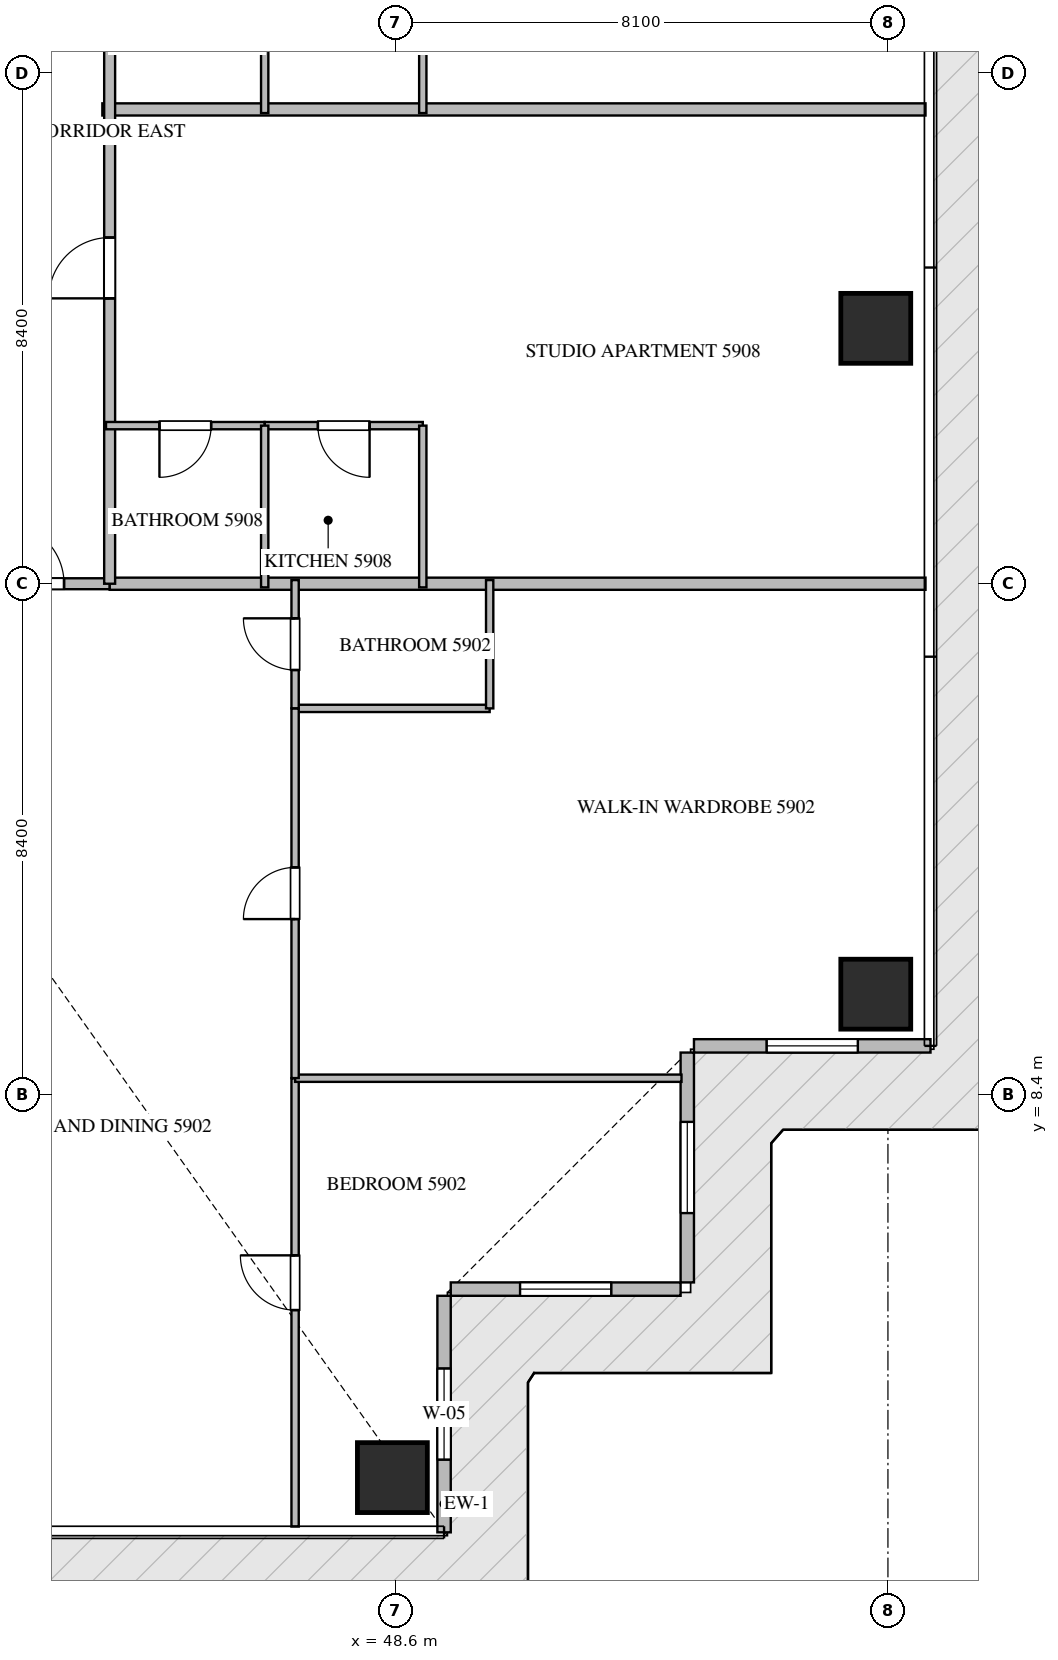
"""IFC4 building model, lengths in metres.
Left out: names, types, materials, properties, quantities, classifications, styles, units other than length and angle.
Written with IfcOpenShell. Run it as: python <this file> out.ifc"""

import sys

from ifc_helpers import new_model, si_unit, direction, frame, frame_2d, origin, origin_2d, place, context, subcontext, project, spatial, rectangle, extrude, source, transform, mapped, element, fill, save


model = new_model("IFC4")
c1 = context("Model", 3, precision=1e-05, world=origin(), true_north=direction((0.0, 1.0)))
c2 = subcontext(c1, "Body", "Model", "MODEL_VIEW")
j1 = project(units=[si_unit("LENGTHUNIT", "METRE"), si_unit("PLANEANGLEUNIT", "RADIAN")], contexts=[c1])
p1 = place(None, origin())
s1 = spatial("IfcSite", under=j1, at=p1, CompositionType="ELEMENT")
p2 = place(p1, origin())
s2 = spatial("IfcBuilding", under=s1, at=p2, CompositionType="ELEMENT")
p3 = place(p2, frame((0.0, 0.0, 237.4)))
s3 = spatial("IfcBuildingStorey", under=s2, at=p3, CompositionType="ELEMENT", Elevation=237.4)
m1 = source(origin(), c2, "Body", "SweptSolid", [
    extrude(rectangle(XDim=1.15, YDim=1.15, at=origin_2d()), origin(), (0.0, 0.0, 1.0), 3.85),
])
for number, where, z_axis, x_axis in (
    (1, (48.55, 2.1, -0.26), (0.0, 0.0, 1.0), (1.0, 0.0, 0.0)),
    (2, (56.5, 10.05, -0.26), (0.0, 0.0, 1.0), (1.0, 0.0, 0.0)),
    (3, (56.5, 21.0, -0.26), (0.0, 0.0, 1.0), (1.0, 0.0, 0.0)),
):
    element("IfcColumn", number, at=place(p3, frame(where, z_axis=z_axis, x_axis=x_axis)), inside=s3, PredefinedType="COLUMN", context=c2, shape_type="MappedRepresentation", body=[
        mapped(m1, transform((0.0, 0.0, 0.0), scale=1.0)),
    ])
p4 = place(p3, frame((49.4, 1.2, 0.0), z_axis=(0.0, 0.0, 1.0), x_axis=(0.0, 1.0, 0.0)))
e4 = element("IfcWall", 4, at=p4, inside=s3, PredefinedType="ELEMENTEDWALL", context=c2, shape_type="SweptSolid", body=[
    extrude(rectangle(XDim=3.89, YDim=0.22, at=frame_2d((1.945, 0.0))), origin(), (0.0, 0.0, 1.0), 3.575),
])
p5 = place(p4, frame((1.195, 0.0, 0.65)))
e5 = element("IfcOpeningElement", 5, at=p5, cuts=e4, PredefinedType="OPENING", context=c2, shape_type="SweptSolid", body=[
    extrude(rectangle(XDim=1.5, YDim=2.25, at=frame_2d((0.75, 1.125))), frame((0.0, 0.12, 0.0), z_axis=(0.0, -1.0, 0.0), x_axis=(1.0, 0.0, 0.0)), (0.0, 0.0, 1.0), 0.24),
])
p6 = place(p3, frame((49.51, 5.2, 0.0), z_axis=(0.0, 0.0, 1.0), x_axis=(1.0, 0.0, 0.0)))
e6 = element("IfcWall", 6, at=p6, inside=s3, PredefinedType="ELEMENTEDWALL", context=c2, shape_type="SweptSolid", body=[
    extrude(rectangle(XDim=3.78, YDim=0.22, at=frame_2d((1.89, 0.0))), origin(), (0.0, 0.0, 1.0), 3.575),
])
p7 = place(p6, frame((1.14, 0.0, 0.65)))
e7 = element("IfcOpeningElement", 7, at=p7, cuts=e6, PredefinedType="OPENING", context=c2, shape_type="SweptSolid", body=[
    extrude(rectangle(XDim=1.5, YDim=2.25, at=frame_2d((0.75, 1.125))), frame((0.0, 0.12, 0.0), z_axis=(0.0, -1.0, 0.0), x_axis=(1.0, 0.0, 0.0)), (0.0, 0.0, 1.0), 0.24),
])
p8 = place(p3, frame((53.4, 5.31, 0.0), z_axis=(0.0, 0.0, 1.0), x_axis=(0.0, 1.0, 0.0)))
e8 = element("IfcWall", 8, at=p8, inside=s3, PredefinedType="ELEMENTEDWALL", context=c2, shape_type="SweptSolid", body=[
    extrude(rectangle(XDim=3.78, YDim=0.22, at=frame_2d((1.89, 0.0))), origin(), (0.0, 0.0, 1.0), 3.575),
])
p9 = place(p8, frame((1.14, 0.0, 0.65)))
e9 = element("IfcOpeningElement", 9, at=p9, cuts=e8, PredefinedType="OPENING", context=c2, shape_type="SweptSolid", body=[
    extrude(rectangle(XDim=1.5, YDim=2.25, at=frame_2d((0.75, 1.125))), frame((0.0, 0.12, 0.0), z_axis=(0.0, -1.0, 0.0), x_axis=(1.0, 0.0, 0.0)), (0.0, 0.0, 1.0), 0.24),
])
p10 = place(p3, frame((53.51, 9.2, 0.0), z_axis=(0.0, 0.0, 1.0), x_axis=(1.0, 0.0, 0.0)))
e10 = element("IfcWall", 10, at=p10, inside=s3, PredefinedType="ELEMENTEDWALL", context=c2, shape_type="SweptSolid", body=[
    extrude(rectangle(XDim=3.89, YDim=0.22, at=frame_2d((1.945, 0.0))), origin(), (0.0, 0.0, 1.0), 3.575),
])
p11 = place(p10, frame((1.195, 0.0, 0.65)))
e11 = element("IfcOpeningElement", 11, at=p11, cuts=e10, PredefinedType="OPENING", context=c2, shape_type="SweptSolid", body=[
    extrude(rectangle(XDim=1.5, YDim=2.25, at=frame_2d((0.75, 1.125))), frame((0.0, 0.12, 0.0), z_axis=(0.0, -1.0, 0.0), x_axis=(1.0, 0.0, 0.0)), (0.0, 0.0, 1.0), 0.24),
])
p12 = place(p3, frame((43.78, 24.6, 0.0), z_axis=(0.0, 0.0, 1.0), x_axis=(1.0, 0.0, 0.0)))
e12 = element("IfcWall", 12, at=p12, inside=s3, PredefinedType="PARTITIONING", context=c2, shape_type="SweptSolid", body=[
    extrude(rectangle(XDim=13.538, YDim=0.2, at=frame_2d((6.769, 0.0))), origin(), (0.0, 0.0, 1.0), 3.59),
])
p13 = place(p3, frame((43.9, 16.8, 0.0), z_axis=(0.0, 0.0, 1.0), x_axis=(1.0, 0.0, 0.0)))
e13 = element("IfcWall", 13, at=p13, inside=s3, PredefinedType="PARTITIONING", context=c2, shape_type="SweptSolid", body=[
    extrude(rectangle(XDim=13.418, YDim=0.2, at=frame_2d((6.709, 0.0))), origin(), (0.0, 0.0, 1.0), 3.59),
])
p14 = place(p3, frame((41.402, 16.8, 0.0), z_axis=(0.0, 0.0, 1.0), x_axis=(1.0, 0.0, 0.0)))
e14 = element("IfcWall", 14, at=p14, inside=s3, PredefinedType="PARTITIONING", context=c2, shape_type="SweptSolid", body=[
    extrude(rectangle(XDim=2.496, YDim=0.18, at=frame_2d((1.248, 0.0))), origin(), (0.0, 0.0, 1.0), 3.59),
])
p15 = place(p14, frame((0.748, 0.0, 0.0)))
e15 = element("IfcOpeningElement", 15, at=p15, cuts=e14, PredefinedType="OPENING", context=c2, shape_type="SweptSolid", body=[
    extrude(rectangle(XDim=1.0, YDim=2.15, at=frame_2d((0.5, 1.075))), frame((0.0, 0.1, 0.0), z_axis=(0.0, -1.0, 0.0), x_axis=(1.0, 0.0, 0.0)), (0.0, 0.0, 1.0), 0.2),
])
p16 = place(p3, frame((43.9, 16.8, 0.0), z_axis=(0.0, 0.0, 1.0), x_axis=(0.0, 1.0, 0.0)))
e16 = element("IfcWall", 16, at=p16, inside=s3, PredefinedType="PARTITIONING", context=c2, shape_type="SweptSolid", body=[
    extrude(rectangle(XDim=16.8, YDim=0.18, at=frame_2d((8.4, 0.0))), origin(), (0.0, 0.0, 1.0), 3.59),
])
p17 = place(p16, frame((4.693, 0.0, 0.0)))
e17 = element("IfcOpeningElement", 17, at=p17, cuts=e16, PredefinedType="OPENING", context=c2, shape_type="SweptSolid", body=[
    extrude(rectangle(XDim=1.0, YDim=2.15, at=frame_2d((0.5, 1.075))), frame((0.0, 0.1, 0.0), z_axis=(0.0, -1.0, 0.0), x_axis=(1.0, 0.0, 0.0)), (0.0, 0.0, 1.0), 0.2),
])
p18 = place(p16, frame((13.13, 0.0, 0.0)))
e18 = element("IfcOpeningElement", 18, at=p18, cuts=e16, PredefinedType="OPENING", context=c2, shape_type="SweptSolid", body=[
    extrude(rectangle(XDim=1.0, YDim=2.15, at=frame_2d((0.5, 1.075))), frame((0.0, 0.1, 0.0), z_axis=(0.0, -1.0, 0.0), x_axis=(1.0, 0.0, 0.0)), (0.0, 0.0, 1.0), 0.2),
])
p19 = place(p3, frame((46.95, 1.295, 0.0), z_axis=(0.0, 0.0, 1.0), x_axis=(0.0, 1.0, 0.0)))
e19 = element("IfcWall", 19, at=p19, inside=s3, PredefinedType="PARTITIONING", context=c2, shape_type="SweptSolid", body=[
    extrude(rectangle(XDim=7.373, YDim=0.12, at=frame_2d((3.687, 0.0))), origin(), (0.0, 0.0, 1.0), 3.59),
])
p20 = place(p19, frame((3.56, 0.0, 0.0)))
e20 = element("IfcOpeningElement", 20, at=p20, cuts=e19, PredefinedType="OPENING", context=c2, shape_type="SweptSolid", body=[
    extrude(rectangle(XDim=0.9, YDim=2.1, at=frame_2d((0.45, 1.05))), frame((0.0, 0.07, 0.0), z_axis=(0.0, -1.0, 0.0), x_axis=(1.0, 0.0, 0.0)), (0.0, 0.0, 1.0), 0.14),
])
p21 = place(p3, frame((46.95, 8.668, 0.0), z_axis=(0.0, 0.0, 1.0), x_axis=(1.0, 0.0, 0.0)))
e21 = element("IfcWall", 21, at=p21, inside=s3, PredefinedType="PARTITIONING", context=c2, shape_type="SweptSolid", body=[
    extrude(rectangle(XDim=6.355, YDim=0.12, at=frame_2d((3.177, 0.0))), origin(), (0.0, 0.0, 1.0), 3.59),
])
p22 = place(p3, frame((46.95, 14.75, 0.0), z_axis=(0.0, 0.0, 1.0), x_axis=(1.0, 0.0, 0.0)))
e22 = element("IfcWall", 22, at=p22, inside=s3, PredefinedType="PARTITIONING", context=c2, shape_type="SweptSolid", body=[
    extrude(rectangle(XDim=3.2, YDim=0.12, at=frame_2d((1.6, 0.0))), origin(), (0.0, 0.0, 1.0), 3.59),
])
p23 = place(p3, frame((50.15, 14.75, 0.0), z_axis=(0.0, 0.0, 1.0), x_axis=(0.0, 1.0, 0.0)))
e23 = element("IfcWall", 23, at=p23, inside=s3, PredefinedType="PARTITIONING", context=c2, shape_type="SweptSolid", body=[
    extrude(rectangle(XDim=2.11, YDim=0.12, at=frame_2d((1.055, 0.0))), origin(), (0.0, 0.0, 1.0), 3.59),
])
p24 = place(p3, frame((46.95, 8.67, 0.0), z_axis=(0.0, 0.0, 1.0), x_axis=(0.0, 1.0, 0.0)))
e24 = element("IfcWall", 24, at=p24, inside=s3, PredefinedType="PARTITIONING", context=c2, shape_type="SweptSolid", body=[
    extrude(rectangle(XDim=6.08, YDim=0.12, at=frame_2d((3.04, 0.0))), origin(), (0.0, 0.0, 1.0), 3.59),
])
p25 = place(p24, frame((2.615, 0.0, 0.0)))
e25 = element("IfcOpeningElement", 25, at=p25, cuts=e24, PredefinedType="OPENING", context=c2, shape_type="SweptSolid", body=[
    extrude(rectangle(XDim=0.85, YDim=2.1, at=frame_2d((0.425, 1.05))), frame((0.0, 0.07, 0.0), z_axis=(0.0, -1.0, 0.0), x_axis=(1.0, 0.0, 0.0)), (0.0, 0.0, 1.0), 0.14),
])
p26 = place(p3, frame((46.95, 14.752, 0.0), z_axis=(0.0, 0.0, 1.0), x_axis=(0.0, 1.0, 0.0)))
e26 = element("IfcWall", 26, at=p26, inside=s3, PredefinedType="PARTITIONING", context=c2, shape_type="SweptSolid", body=[
    extrude(rectangle(XDim=2.108, YDim=0.12, at=frame_2d((1.054, 0.0))), origin(), (0.0, 0.0, 1.0), 3.59),
])
p27 = place(p26, frame((0.629, 0.0, 0.0)))
e27 = element("IfcOpeningElement", 27, at=p27, cuts=e26, PredefinedType="OPENING", context=c2, shape_type="SweptSolid", body=[
    extrude(rectangle(XDim=0.85, YDim=2.1, at=frame_2d((0.425, 1.05))), frame((0.0, 0.07, 0.0), z_axis=(0.0, -1.0, 0.0), x_axis=(1.0, 0.0, 0.0)), (0.0, 0.0, 1.0), 0.14),
])
p28 = place(p3, frame((49.05, 19.4, 0.0), z_axis=(0.0, 0.0, 1.0), x_axis=(-1.0, 0.0, 0.0)))
e28 = element("IfcWall", 28, at=p28, inside=s3, PredefinedType="PARTITIONING", context=c2, shape_type="SweptSolid", body=[
    extrude(rectangle(XDim=2.6, YDim=0.12, at=frame_2d((1.3, 0.0))), origin(), (0.0, 0.0, 1.0), 3.59),
])
p29 = place(p28, frame((0.875, 0.0, 0.0)))
e29 = element("IfcOpeningElement", 29, at=p29, cuts=e28, PredefinedType="OPENING", context=c2, shape_type="SweptSolid", body=[
    extrude(rectangle(XDim=0.85, YDim=2.1, at=frame_2d((0.425, 1.05))), frame((0.0, 0.07, 0.0), z_axis=(0.0, -1.0, 0.0), x_axis=(1.0, 0.0, 0.0)), (0.0, 0.0, 1.0), 0.14),
])
p30 = place(p3, frame((46.448, 19.4, 0.0), z_axis=(0.0, 0.0, 1.0), x_axis=(-1.0, 0.0, 0.0)))
e30 = element("IfcWall", 30, at=p30, inside=s3, PredefinedType="PARTITIONING", context=c2, shape_type="SweptSolid", body=[
    extrude(rectangle(XDim=2.608, YDim=0.12, at=frame_2d((1.304, 0.0))), origin(), (0.0, 0.0, 1.0), 3.59),
])
p31 = place(p30, frame((0.879, 0.0, 0.0)))
e31 = element("IfcOpeningElement", 31, at=p31, cuts=e30, PredefinedType="OPENING", context=c2, shape_type="SweptSolid", body=[
    extrude(rectangle(XDim=0.85, YDim=2.1, at=frame_2d((0.425, 1.05))), frame((0.0, 0.07, 0.0), z_axis=(0.0, -1.0, 0.0), x_axis=(1.0, 0.0, 0.0)), (0.0, 0.0, 1.0), 0.14),
])
for number, where, z_axis, x_axis in (
    (32, (46.45, 16.74, 0.0), (0.0, 0.0, 1.0), (0.0, 1.0, 0.0)),
    (33, (49.05, 16.74, 0.0), (0.0, 0.0, 1.0), (0.0, 1.0, 0.0)),
):
    element("IfcWall", number, at=place(p3, frame(where, z_axis=z_axis, x_axis=x_axis)), inside=s3, PredefinedType="PARTITIONING", context=c2, shape_type="SweptSolid", body=[
        extrude(rectangle(XDim=2.66, YDim=0.12, at=frame_2d((1.33, 0.0))), origin(), (0.0, 0.0, 1.0), 3.59),
    ])
for number, where, z_axis, x_axis in (
    (34, (46.45, 24.54, 0.0), (0.0, 0.0, 1.0), (0.0, 1.0, 0.0)),
    (35, (49.05, 24.54, 0.0), (0.0, 0.0, 1.0), (0.0, 1.0, 0.0)),
):
    element("IfcWall", number, at=place(p3, frame(where, z_axis=z_axis, x_axis=x_axis)), inside=s3, PredefinedType="PARTITIONING", context=c2, shape_type="SweptSolid", body=[
        extrude(rectangle(XDim=2.81, YDim=0.12, at=frame_2d((1.405, 0.0))), origin(), (0.0, 0.0, 1.0), 3.59),
    ])
m2 = source(origin(), c2, "Body", "SweptSolid", [
    extrude(rectangle(XDim=1.5, YDim=2.25, at=frame_2d((0.75, 1.125))), frame((0.0, 0.03, 0.0), z_axis=(0.0, -1.0, 0.0), x_axis=(1.0, 0.0, 0.0)), (0.0, 0.0, 1.0), 0.06),
])
p32 = place(p5, origin())
e36 = element("IfcWindow", 36, at=p32, inside=s3, PartitioningType="SINGLE_PANEL", PredefinedType="WINDOW", context=c2, shape_type="MappedRepresentation", body=[
    mapped(m2, transform((0.0, 0.0, 0.0), scale=1.0)),
])
fill(e5, e36)
p33 = place(p7, origin())
e37 = element("IfcWindow", 37, at=p33, inside=s3, PartitioningType="SINGLE_PANEL", PredefinedType="WINDOW", context=c2, shape_type="MappedRepresentation", body=[
    mapped(m2, transform((0.0, 0.0, 0.0), scale=1.0)),
])
fill(e7, e37)
p34 = place(p9, origin())
e38 = element("IfcWindow", 38, at=p34, inside=s3, PartitioningType="SINGLE_PANEL", PredefinedType="WINDOW", context=c2, shape_type="MappedRepresentation", body=[
    mapped(m2, transform((0.0, 0.0, 0.0), scale=1.0)),
])
fill(e9, e38)
p35 = place(p11, origin())
e39 = element("IfcWindow", 39, at=p35, inside=s3, PartitioningType="SINGLE_PANEL", PredefinedType="WINDOW", context=c2, shape_type="MappedRepresentation", body=[
    mapped(m2, transform((0.0, 0.0, 0.0), scale=1.0)),
])
fill(e11, e39)
m3 = source(origin(), c2, "Body", "SweptSolid", [
    extrude(rectangle(XDim=1.0, YDim=2.15, at=frame_2d((0.5, 1.075))), frame((0.0, 0.025, 0.0), z_axis=(0.0, -1.0, 0.0), x_axis=(1.0, 0.0, 0.0)), (0.0, 0.0, 1.0), 0.05),
])
p36 = place(p15, origin())
e40 = element("IfcDoor", 40, at=p36, inside=s3, OperationType="SINGLE_SWING_LEFT", PredefinedType="DOOR", context=c2, shape_type="MappedRepresentation", body=[
    mapped(m3, transform((0.0, 0.0, 0.0), scale=1.0)),
])
fill(e15, e40)
p37 = place(p17, origin())
e41 = element("IfcDoor", 41, at=p37, inside=s3, OperationType="SINGLE_SWING_LEFT", PredefinedType="DOOR", context=c2, shape_type="MappedRepresentation", body=[
    mapped(m3, transform((0.0, 0.0, 0.0), scale=1.0)),
])
fill(e17, e41)
m4 = source(origin(), c2, "Body", "SweptSolid", [
    extrude(rectangle(XDim=0.9, YDim=2.1, at=frame_2d((0.45, 1.05))), frame((0.0, 0.025, 0.0), z_axis=(0.0, -1.0, 0.0), x_axis=(1.0, 0.0, 0.0)), (0.0, 0.0, 1.0), 0.05),
])
p38 = place(p20, origin())
e42 = element("IfcDoor", 42, at=p38, inside=s3, OperationType="SINGLE_SWING_RIGHT", PredefinedType="DOOR", context=c2, shape_type="MappedRepresentation", body=[
    mapped(m4, transform((0.0, 0.0, 0.0), scale=1.0)),
])
fill(e20, e42)
m5 = source(origin(), c2, "Body", "SweptSolid", [
    extrude(rectangle(XDim=0.85, YDim=2.1, at=frame_2d((0.425, 1.05))), frame((0.0, 0.025, 0.0), z_axis=(0.0, -1.0, 0.0), x_axis=(1.0, 0.0, 0.0)), (0.0, 0.0, 1.0), 0.05),
])
p39 = place(p25, origin())
e43 = element("IfcDoor", 43, at=p39, inside=s3, OperationType="SINGLE_SWING_LEFT", PredefinedType="DOOR", context=c2, shape_type="MappedRepresentation", body=[
    mapped(m5, transform((0.0, 0.0, 0.0), scale=1.0)),
])
fill(e25, e43)
p40 = place(p27, origin())
e44 = element("IfcDoor", 44, at=p40, inside=s3, OperationType="SINGLE_SWING_RIGHT", PredefinedType="DOOR", context=c2, shape_type="MappedRepresentation", body=[
    mapped(m5, transform((0.0, 0.0, 0.0), scale=1.0)),
])
fill(e27, e44)
p41 = place(p29, origin())
e45 = element("IfcDoor", 45, at=p41, inside=s3, OperationType="SINGLE_SWING_LEFT", PredefinedType="DOOR", context=c2, shape_type="MappedRepresentation", body=[
    mapped(m5, transform((0.0, 0.0, 0.0), scale=1.0)),
])
fill(e29, e45)
p42 = place(p31, origin())
e46 = element("IfcDoor", 46, at=p42, inside=s3, OperationType="SINGLE_SWING_RIGHT", PredefinedType="DOOR", context=c2, shape_type="MappedRepresentation", body=[
    mapped(m5, transform((0.0, 0.0, 0.0), scale=1.0)),
])
fill(e31, e46)
save(model, sys.argv[1])
